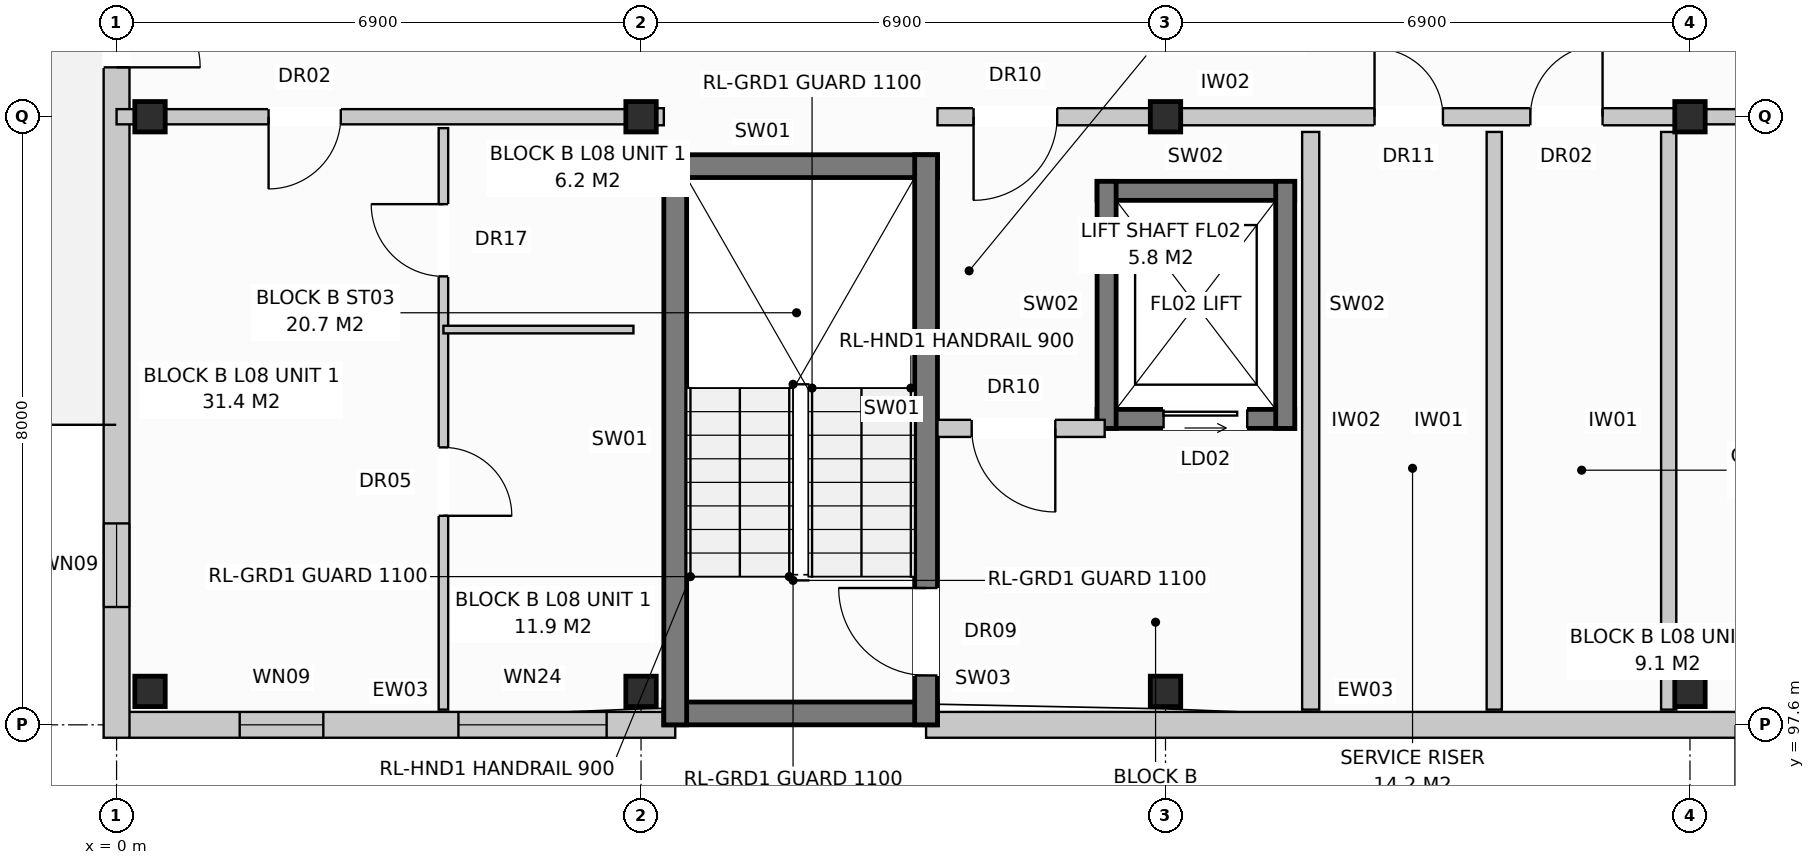
"""IFC4 building model, lengths in metres.
Left out: names, types, materials, properties, quantities, classifications, styles, units other than length and angle.
Written with IfcOpenShell. Run it as: python <this file> out.ifc"""

import sys

from ifc_helpers import new_model, si_unit, direction, frame, frame_2d, origin, origin_with_axes, origin_2d, place, context, subcontext, project, spatial, rectangle, extrude, element, fill, save


model = new_model("IFC4")
c1 = context("Model", 3, precision=1e-05, world=origin(), true_north=direction((0.0, 1.0)))
c2 = subcontext(c1, "Body", "Model", "MODEL_VIEW")
j1 = project(units=[si_unit("LENGTHUNIT", "METRE"), si_unit("PLANEANGLEUNIT", "RADIAN")], contexts=[c1])
p1 = place(None, origin())
s1 = spatial("IfcSite", under=j1, at=p1, CompositionType="ELEMENT")
p2 = place(p1, origin())
s2 = spatial("IfcBuilding", under=s1, at=p2, CompositionType="ELEMENT")
p3 = place(p2, frame((0.0, 0.0, 27.2)))
s3 = spatial("IfcBuildingStorey", under=s2, at=p3, CompositionType="ELEMENT", Elevation=27.2)
for number, where, z_axis, x_axis in (
    (1, (0.44, 98.04, 0.0), (0.0, 0.0, 1.0), (1.0, 0.0, 0.0)),
    (2, (0.44, 105.6, 0.0), (0.0, 0.0, 1.0), (1.0, 0.0, 0.0)),
    (3, (6.9, 98.04, 0.0), (0.0, 0.0, 1.0), (1.0, 0.0, 0.0)),
    (4, (6.9, 105.6, 0.0), (0.0, 0.0, 1.0), (1.0, 0.0, 0.0)),
    (5, (13.8, 98.04, 0.0), (0.0, 0.0, 1.0), (1.0, 0.0, 0.0)),
    (6, (13.8, 105.6, 0.0), (0.0, 0.0, 1.0), (1.0, 0.0, 0.0)),
    (7, (20.7, 98.04, 0.0), (0.0, 0.0, 1.0), (1.0, 0.0, 0.0)),
    (8, (20.7, 105.6, 0.0), (0.0, 0.0, 1.0), (1.0, 0.0, 0.0)),
):
    element("IfcColumn", number, at=place(p3, frame(where, z_axis=z_axis, x_axis=x_axis)), inside=s3, PredefinedType="COLUMN", context=c2, shape_type="SweptSolid", body=[
        extrude(rectangle(XDim=0.4, YDim=0.4, at=origin_2d()), origin(), (0.0, 0.0, 1.0), 3.2),
    ])
p4 = place(p3, frame((0.16, 97.6, 0.0), z_axis=(0.0, 0.0, 1.0), x_axis=(1.0, 0.0, 0.0)))
e9 = element("IfcWall", 9, at=p4, inside=s3, PredefinedType="STANDARD", context=c2, shape_type="SweptSolid", body=[
    extrude(rectangle(XDim=7.19, YDim=0.34, at=frame_2d((3.595, 0.0))), origin(), (0.0, 0.0, 1.0), 2.96),
])
p5 = place(p4, frame((1.46, 0.0, 0.72)))
e10 = element("IfcOpeningElement", 10, at=p5, cuts=e9, PredefinedType="OPENING", context=c2, shape_type="SweptSolid", body=[
    extrude(rectangle(XDim=1.1, YDim=1.5, at=frame_2d((0.55, 0.75))), frame((0.0, 0.182, 0.0), z_axis=(0.0, -1.0, 0.0), x_axis=(1.0, 0.0, 0.0)), (0.0, 0.0, 1.0), 0.364),
])
p6 = place(p4, frame((4.337, 0.0, 0.8)))
e11 = element("IfcOpeningElement", 11, at=p6, cuts=e9, PredefinedType="OPENING", context=c2, shape_type="SweptSolid", body=[
    extrude(rectangle(XDim=1.95, YDim=1.65, at=frame_2d((0.975, 0.825))), frame((0.0, 0.182, 0.0), z_axis=(0.0, -1.0, 0.0), x_axis=(1.0, 0.0, 0.0)), (0.0, 0.0, 1.0), 0.364),
])
p7 = place(p3, frame((10.65, 97.6, 0.0), z_axis=(0.0, 0.0, 1.0), x_axis=(1.0, 0.0, 0.0)))
e12 = element("IfcWall", 12, at=p7, inside=s3, PredefinedType="STANDARD", context=c2, shape_type="SweptSolid", body=[
    extrude(rectangle(XDim=17.4, YDim=0.34, at=frame_2d((8.7, 0.0))), origin(), (0.0, 0.0, 1.0), 2.96),
])
p8 = place(p7, frame((11.87, 0.0, 0.0)))
e13 = element("IfcOpeningElement", 13, at=p8, cuts=e12, PredefinedType="OPENING", context=c2, shape_type="SweptSolid", body=[
    extrude(rectangle(XDim=0.95, YDim=2.1, at=frame_2d((0.475, 1.05))), frame((0.0, 0.182, 0.0), z_axis=(0.0, -1.0, 0.0), x_axis=(1.0, 0.0, 0.0)), (0.0, 0.0, 1.0), 0.364),
])
p9 = place(p7, frame((14.87, 0.0, 0.72)))
e14 = element("IfcOpeningElement", 14, at=p9, cuts=e12, PredefinedType="OPENING", context=c2, shape_type="SweptSolid", body=[
    extrude(rectangle(XDim=1.1, YDim=1.5, at=frame_2d((0.55, 0.75))), frame((0.0, 0.182, 0.0), z_axis=(0.0, -1.0, 0.0), x_axis=(1.0, 0.0, 0.0)), (0.0, 0.0, 1.0), 0.364),
])
p10 = place(p3, frame((0.0, 97.43, 0.0), z_axis=(0.0, 0.0, 1.0), x_axis=(0.0, 1.0, 0.0)))
e15 = element("IfcWall", 15, at=p10, inside=s3, PredefinedType="STANDARD", context=c2, shape_type="SweptSolid", body=[
    extrude(rectangle(XDim=18.74, YDim=0.34, at=frame_2d((9.37, 0.0))), origin(), (0.0, 0.0, 1.0), 2.96),
])
p11 = place(p10, frame((8.82, 0.0, 0.0)))
e16 = element("IfcOpeningElement", 16, at=p11, cuts=e15, PredefinedType="OPENING", context=c2, shape_type="SweptSolid", body=[
    extrude(rectangle(XDim=1.1, YDim=2.1, at=frame_2d((0.55, 1.05))), frame((0.0, 0.182, 0.0), z_axis=(0.0, -1.0, 0.0), x_axis=(1.0, 0.0, 0.0)), (0.0, 0.0, 1.0), 0.364),
])
p12 = place(p10, frame((1.72, 0.0, 0.72)))
e17 = element("IfcOpeningElement", 17, at=p12, cuts=e15, PredefinedType="OPENING", context=c2, shape_type="SweptSolid", body=[
    extrude(rectangle(XDim=1.1, YDim=1.5, at=frame_2d((0.55, 0.75))), frame((0.0, 0.182, 0.0), z_axis=(0.0, -1.0, 0.0), x_axis=(1.0, 0.0, 0.0)), (0.0, 0.0, 1.0), 0.364),
])
p13 = place(p10, frame((15.92, 0.0, 0.72)))
e18 = element("IfcOpeningElement", 18, at=p13, cuts=e15, PredefinedType="OPENING", context=c2, shape_type="SweptSolid", body=[
    extrude(rectangle(XDim=1.1, YDim=1.5, at=frame_2d((0.55, 0.75))), frame((0.0, 0.182, 0.0), z_axis=(0.0, -1.0, 0.0), x_axis=(1.0, 0.0, 0.0)), (0.0, 0.0, 1.0), 0.364),
])
for number, where, z_axis, x_axis in (
    (19, (7.2, 97.75, 0.0), (0.0, 0.0, 1.0), (1.0, 0.0, 0.0)),
    (20, (7.2, 104.95, 0.0), (0.0, 0.0, 1.0), (1.0, 0.0, 0.0)),
):
    element("IfcWall", number, at=place(p3, frame(where, z_axis=z_axis, x_axis=x_axis)), inside=s3, PredefinedType="SHEAR", context=c2, shape_type="SweptSolid", body=[
        extrude(rectangle(XDim=3.6, YDim=0.3, at=frame_2d((1.8, 0.0))), origin(), (0.0, 0.0, 1.0), 2.96),
    ])
p14 = place(p3, frame((7.35, 97.6, 0.0), z_axis=(0.0, 0.0, 1.0), x_axis=(0.0, 1.0, 0.0)))
e21 = element("IfcWall", 21, at=p14, inside=s3, PredefinedType="SHEAR", context=c2, shape_type="SweptSolid", body=[
    extrude(rectangle(XDim=7.5, YDim=0.3, at=frame_2d((3.75, 0.0))), origin(), (0.0, 0.0, 1.0), 2.96),
])
p15 = place(p3, frame((10.65, 97.6, 0.0), z_axis=(0.0, 0.0, 1.0), x_axis=(0.0, 1.0, 0.0)))
e22 = element("IfcWall", 22, at=p15, inside=s3, PredefinedType="SHEAR", context=c2, shape_type="SweptSolid", body=[
    extrude(rectangle(XDim=7.5, YDim=0.3, at=frame_2d((3.75, 0.0))), origin(), (0.0, 0.0, 1.0), 2.96),
])
p16 = place(p15, frame((0.65, 0.0, 0.0)))
e23 = element("IfcOpeningElement", 23, at=p16, cuts=e22, PredefinedType="OPENING", context=c2, shape_type="SweptSolid", body=[
    extrude(rectangle(XDim=1.15, YDim=2.15, at=frame_2d((0.575, 1.075))), frame((0.0, 0.162, 0.0), z_axis=(0.0, -1.0, 0.0), x_axis=(1.0, 0.0, 0.0)), (0.0, 0.0, 1.0), 0.324),
])
p17 = place(p3, frame((12.9, 101.625, 0.0), z_axis=(0.0, 0.0, 1.0), x_axis=(1.0, 0.0, 0.0)))
e24 = element("IfcWall", 24, at=p17, inside=s3, PredefinedType="SHEAR", context=c2, shape_type="SweptSolid", body=[
    extrude(rectangle(XDim=2.6, YDim=0.25, at=frame_2d((1.3, 0.0))), origin(), (0.0, 0.0, 1.0), 2.96),
])
p18 = place(p17, frame((0.875, 0.0, 0.0)))
e25 = element("IfcOpeningElement", 25, at=p18, cuts=e24, PredefinedType="OPENING", context=c2, shape_type="SweptSolid", body=[
    extrude(rectangle(XDim=1.1, YDim=2.1, at=frame_2d((0.55, 1.05))), frame((0.0, 0.137, 0.0), z_axis=(0.0, -1.0, 0.0), x_axis=(1.0, 0.0, 0.0)), (0.0, 0.0, 1.0), 0.274),
])
p19 = place(p3, frame((12.9, 104.625, 0.0), z_axis=(0.0, 0.0, 1.0), x_axis=(1.0, 0.0, 0.0)))
e26 = element("IfcWall", 26, at=p19, inside=s3, PredefinedType="SHEAR", context=c2, shape_type="SweptSolid", body=[
    extrude(rectangle(XDim=2.6, YDim=0.25, at=frame_2d((1.3, 0.0))), origin(), (0.0, 0.0, 1.0), 2.96),
])
for number, where, z_axis, x_axis in (
    (27, (13.025, 101.5, 0.0), (0.0, 0.0, 1.0), (0.0, 1.0, 0.0)),
    (28, (15.375, 101.5, 0.0), (0.0, 0.0, 1.0), (0.0, 1.0, 0.0)),
):
    element("IfcWall", number, at=place(p3, frame(where, z_axis=z_axis, x_axis=x_axis)), inside=s3, PredefinedType="SHEAR", context=c2, shape_type="SweptSolid", body=[
        extrude(rectangle(XDim=3.25, YDim=0.25, at=frame_2d((1.625, 0.0))), origin(), (0.0, 0.0, 1.0), 2.96),
    ])
p20 = place(p3, frame((15.71, 97.8, 0.0), z_axis=(0.0, 0.0, 1.0), x_axis=(0.0, 1.0, 0.0)))
e29 = element("IfcWall", 29, at=p20, inside=s3, PredefinedType="PARTITIONING", context=c2, shape_type="SweptSolid", body=[
    extrude(rectangle(XDim=7.6, YDim=0.225, at=frame_2d((3.8, 0.0))), origin(), (0.0, 0.0, 1.0), 2.59),
])
p21 = place(p3, frame((10.8, 101.5, 0.0), z_axis=(0.0, 0.0, 1.0), x_axis=(1.0, 0.0, 0.0)))
e30 = element("IfcWall", 30, at=p21, inside=s3, PredefinedType="PARTITIONING", context=c2, shape_type="SweptSolid", body=[
    extrude(rectangle(XDim=2.2, YDim=0.225, at=frame_2d((1.1, 0.0))), origin(), (0.0, 0.0, 1.0), 2.96),
])
p22 = place(p21, frame((0.45, 0.0, 0.0)))
e31 = element("IfcOpeningElement", 31, at=p22, cuts=e30, PredefinedType="OPENING", context=c2, shape_type="SweptSolid", body=[
    extrude(rectangle(XDim=1.1, YDim=2.15, at=frame_2d((0.55, 1.075))), frame((0.0, 0.125, 0.0), z_axis=(0.0, -1.0, 0.0), x_axis=(1.0, 0.0, 0.0)), (0.0, 0.0, 1.0), 0.249),
])
p23 = place(p3, frame((6.9, 105.6, 0.0), z_axis=(0.0, 0.0, 1.0), x_axis=(1.0, 0.0, 0.0)))
e32 = element("IfcWall", 32, at=p23, inside=s3, PredefinedType="PARTITIONING", context=c2, shape_type="SweptSolid", body=[
    extrude(rectangle(XDim=0.3, YDim=0.225, at=frame_2d((0.15, 0.0))), origin(), (0.0, 0.0, 1.0), 2.96),
])
for number, where, z_axis, x_axis in (
    (33, (18.125, 97.8, 0.0), (0.0, 0.0, 1.0), (0.0, 1.0, 0.0)),
    (34, (20.42, 97.8, 0.0), (0.0, 0.0, 1.0), (0.0, 1.0, 0.0)),
):
    element("IfcWall", number, at=place(p3, frame(where, z_axis=z_axis, x_axis=x_axis)), inside=s3, PredefinedType="PARTITIONING", context=c2, shape_type="SweptSolid", body=[
        extrude(rectangle(XDim=7.6, YDim=0.2, at=frame_2d((3.8, 0.0))), origin(), (0.0, 0.0, 1.0), 2.96),
    ])
p24 = place(p3, frame((10.8, 105.6, 0.0), z_axis=(0.0, 0.0, 1.0), x_axis=(1.0, 0.0, 0.0)))
e35 = element("IfcWall", 35, at=p24, inside=s3, PredefinedType="PARTITIONING", context=c2, shape_type="SweptSolid", body=[
    extrude(rectangle(XDim=9.9, YDim=0.225, at=frame_2d((4.95, 0.0))), origin(), (0.0, 0.0, 1.0), 2.4),
])
p25 = place(p24, frame((0.475, 0.0, 0.0)))
e36 = element("IfcOpeningElement", 36, at=p25, cuts=e35, PredefinedType="OPENING", context=c2, shape_type="SweptSolid", body=[
    extrude(rectangle(XDim=1.1, YDim=2.15, at=frame_2d((0.55, 1.075))), frame((0.0, 0.125, 0.0), z_axis=(0.0, -1.0, 0.0), x_axis=(1.0, 0.0, 0.0)), (0.0, 0.0, 1.0), 0.249),
])
p26 = place(p24, frame((5.75, 0.0, 0.0)))
e37 = element("IfcOpeningElement", 37, at=p26, cuts=e35, PredefinedType="OPENING", context=c2, shape_type="SweptSolid", body=[
    extrude(rectangle(XDim=0.9, YDim=2.1, at=frame_2d((0.45, 1.05))), frame((0.0, 0.125, 0.0), z_axis=(0.0, -1.0, 0.0), x_axis=(1.0, 0.0, 0.0)), (0.0, 0.0, 1.0), 0.249),
])
p27 = place(p24, frame((7.8, 0.0, 0.0)))
e38 = element("IfcOpeningElement", 38, at=p27, cuts=e35, PredefinedType="OPENING", context=c2, shape_type="SweptSolid", body=[
    extrude(rectangle(XDim=0.95, YDim=2.15, at=frame_2d((0.475, 1.075))), frame((0.0, 0.125, 0.0), z_axis=(0.0, -1.0, 0.0), x_axis=(1.0, 0.0, 0.0)), (0.0, 0.0, 1.0), 0.249),
])
p28 = place(p3, frame((0.0, 105.6, 0.0), z_axis=(0.0, 0.0, 1.0), x_axis=(1.0, 0.0, 0.0)))
e39 = element("IfcWall", 39, at=p28, inside=s3, PredefinedType="PARTITIONING", context=c2, shape_type="SweptSolid", body=[
    extrude(rectangle(XDim=6.9, YDim=0.2, at=frame_2d((3.45, 0.0))), origin(), (0.0, 0.0, 1.0), 2.4),
])
p29 = place(p28, frame((2.0, 0.0, 0.0)))
e40 = element("IfcOpeningElement", 40, at=p29, cuts=e39, PredefinedType="OPENING", context=c2, shape_type="SweptSolid", body=[
    extrude(rectangle(XDim=0.95, YDim=2.15, at=frame_2d((0.475, 1.075))), frame((0.0, 0.112, 0.0), z_axis=(0.0, -1.0, 0.0), x_axis=(1.0, 0.0, 0.0)), (0.0, 0.0, 1.0), 0.224),
])
p30 = place(p3, frame((4.3, 105.45, 0.0), z_axis=(0.0, 0.0, 1.0), x_axis=(0.0, -1.0, 0.0)))
e41 = element("IfcWall", 41, at=p30, inside=s3, PredefinedType="PARTITIONING", context=c2, shape_type="SweptSolid", body=[
    extrude(rectangle(XDim=7.65, YDim=0.125, at=frame_2d((3.825, 0.0))), origin(), (0.0, 0.0, 1.0), 2.96),
])
p31 = place(p30, frame((1.0, 0.0, 0.0)))
e42 = element("IfcOpeningElement", 42, at=p31, cuts=e41, PredefinedType="OPENING", context=c2, shape_type="SweptSolid", body=[
    extrude(rectangle(XDim=0.95, YDim=2.1, at=frame_2d((0.475, 1.05))), frame((0.0, 0.074, 0.0), z_axis=(0.0, -1.0, 0.0), x_axis=(1.0, 0.0, 0.0)), (0.0, 0.0, 1.0), 0.149),
])
p32 = place(p30, frame((4.2, 0.0, 0.0)))
e43 = element("IfcOpeningElement", 43, at=p32, cuts=e41, PredefinedType="OPENING", context=c2, shape_type="SweptSolid", body=[
    extrude(rectangle(XDim=0.9, YDim=2.1, at=frame_2d((0.45, 1.05))), frame((0.0, 0.074, 0.0), z_axis=(0.0, -1.0, 0.0), x_axis=(1.0, 0.0, 0.0)), (0.0, 0.0, 1.0), 0.149),
])
p33 = place(p3, frame((4.3, 102.8, 0.0), z_axis=(0.0, 0.0, 1.0), x_axis=(1.0, 0.0, 0.0)))
e44 = element("IfcWall", 44, at=p33, inside=s3, PredefinedType="PARTITIONING", context=c2, shape_type="SweptSolid", body=[
    extrude(rectangle(XDim=2.5, YDim=0.1, at=frame_2d((1.25, 0.0))), origin(), (0.0, 0.0, 1.0), 2.96),
])
p34 = place(p3, frame((20.7, 105.6, 0.0), z_axis=(0.0, 0.0, 1.0), x_axis=(1.0, 0.0, 0.0)))
e45 = element("IfcWall", 45, at=p34, inside=s3, PredefinedType="PARTITIONING", context=c2, shape_type="SweptSolid", body=[
    extrude(rectangle(XDim=6.9, YDim=0.2, at=frame_2d((3.45, 0.0))), origin(), (0.0, 0.0, 1.0), 2.4),
])
p35 = place(p34, frame((2.0, 0.0, 0.0)))
e46 = element("IfcOpeningElement", 46, at=p35, cuts=e45, PredefinedType="OPENING", context=c2, shape_type="SweptSolid", body=[
    extrude(rectangle(XDim=0.95, YDim=2.15, at=frame_2d((0.475, 1.075))), frame((0.0, 0.112, 0.0), z_axis=(0.0, -1.0, 0.0), x_axis=(1.0, 0.0, 0.0)), (0.0, 0.0, 1.0), 0.224),
])
p36 = place(p5, origin_with_axes())
e47 = element("IfcWindow", 47, at=p36, inside=s3, PartitioningType="SINGLE_PANEL", PredefinedType="WINDOW", context=c2, shape_type="SweptSolid", body=[
    extrude(rectangle(XDim=1.1, YDim=1.5, at=frame_2d((0.55, 0.75))), frame((0.0, 0.03, 0.0), z_axis=(0.0, -1.0, 0.0), x_axis=(1.0, 0.0, 0.0)), (0.0, 0.0, 1.0), 0.06),
])
fill(e10, e47)
p37 = place(p6, origin_with_axes())
e48 = element("IfcWindow", 48, at=p37, inside=s3, PartitioningType="SINGLE_PANEL", PredefinedType="WINDOW", context=c2, shape_type="SweptSolid", body=[
    extrude(rectangle(XDim=1.95, YDim=1.65, at=frame_2d((0.975, 0.825))), frame((0.0, 0.03, 0.0), z_axis=(0.0, -1.0, 0.0), x_axis=(1.0, 0.0, 0.0)), (0.0, 0.0, 1.0), 0.06),
])
fill(e11, e48)
p38 = place(p11, frame((1.1, 0.0, 0.0), z_axis=(0.0, 0.0, 1.0), x_axis=(-1.0, 0.0, 0.0)))
e49 = element("IfcDoor", 49, at=p38, inside=s3, OperationType="SINGLE_SWING_LEFT", PredefinedType="DOOR", context=c2, shape_type="SweptSolid", body=[
    extrude(rectangle(XDim=1.1, YDim=2.1, at=frame_2d((0.55, 1.05))), frame((0.0, 0.025, 0.0), z_axis=(0.0, -1.0, 0.0), x_axis=(1.0, 0.0, 0.0)), (0.0, 0.0, 1.0), 0.05),
])
fill(e16, e49)
p39 = place(p12, origin_with_axes())
e50 = element("IfcWindow", 50, at=p39, inside=s3, PartitioningType="SINGLE_PANEL", PredefinedType="WINDOW", context=c2, shape_type="SweptSolid", body=[
    extrude(rectangle(XDim=1.1, YDim=1.5, at=frame_2d((0.55, 0.75))), frame((0.0, 0.03, 0.0), z_axis=(0.0, -1.0, 0.0), x_axis=(1.0, 0.0, 0.0)), (0.0, 0.0, 1.0), 0.06),
])
fill(e17, e50)
p40 = place(p16, origin_with_axes())
e51 = element("IfcDoor", 51, at=p40, inside=s3, OperationType="SINGLE_SWING_RIGHT", PredefinedType="DOOR", context=c2, shape_type="SweptSolid", body=[
    extrude(rectangle(XDim=1.15, YDim=2.15, at=frame_2d((0.575, 1.075))), frame((0.0, 0.025, 0.0), z_axis=(0.0, -1.0, 0.0), x_axis=(1.0, 0.0, 0.0)), (0.0, 0.0, 1.0), 0.05),
])
fill(e23, e51)
p41 = place(p18, origin_with_axes())
e52 = element("IfcDoor", 52, at=p41, inside=s3, OperationType="SLIDING_TO_LEFT", PredefinedType="DOOR", context=c2, shape_type="SweptSolid", body=[
    extrude(rectangle(XDim=1.1, YDim=2.1, at=frame_2d((0.55, 1.05))), frame((0.0, 0.025, 0.0), z_axis=(0.0, -1.0, 0.0), x_axis=(1.0, 0.0, 0.0)), (0.0, 0.0, 1.0), 0.05),
])
fill(e25, e52)
p42 = place(p22, frame((1.1, 0.0, 0.0), z_axis=(0.0, 0.0, 1.0), x_axis=(-1.0, 0.0, 0.0)))
e53 = element("IfcDoor", 53, at=p42, inside=s3, OperationType="SINGLE_SWING_RIGHT", PredefinedType="DOOR", context=c2, shape_type="SweptSolid", body=[
    extrude(rectangle(XDim=1.1, YDim=2.15, at=frame_2d((0.55, 1.075))), frame((0.0, 0.025, 0.0), z_axis=(0.0, -1.0, 0.0), x_axis=(1.0, 0.0, 0.0)), (0.0, 0.0, 1.0), 0.05),
])
fill(e31, e53)
p43 = place(p25, frame((1.1, 0.0, 0.0), z_axis=(0.0, 0.0, 1.0), x_axis=(-1.0, 0.0, 0.0)))
e54 = element("IfcDoor", 54, at=p43, inside=s3, OperationType="SINGLE_SWING_LEFT", PredefinedType="DOOR", context=c2, shape_type="SweptSolid", body=[
    extrude(rectangle(XDim=1.1, YDim=2.15, at=frame_2d((0.55, 1.075))), frame((0.0, 0.025, 0.0), z_axis=(0.0, -1.0, 0.0), x_axis=(1.0, 0.0, 0.0)), (0.0, 0.0, 1.0), 0.05),
])
fill(e36, e54)
p44 = place(p26, origin_with_axes())
e55 = element("IfcDoor", 55, at=p44, inside=s3, OperationType="SINGLE_SWING_LEFT", PredefinedType="DOOR", context=c2, shape_type="SweptSolid", body=[
    extrude(rectangle(XDim=0.9, YDim=2.1, at=frame_2d((0.45, 1.05))), frame((0.0, 0.025, 0.0), z_axis=(0.0, -1.0, 0.0), x_axis=(1.0, 0.0, 0.0)), (0.0, 0.0, 1.0), 0.05),
])
fill(e37, e55)
p45 = place(p27, origin_with_axes())
e56 = element("IfcDoor", 56, at=p45, inside=s3, OperationType="SINGLE_SWING_RIGHT", PredefinedType="DOOR", context=c2, shape_type="SweptSolid", body=[
    extrude(rectangle(XDim=0.95, YDim=2.15, at=frame_2d((0.475, 1.075))), frame((0.0, 0.025, 0.0), z_axis=(0.0, -1.0, 0.0), x_axis=(1.0, 0.0, 0.0)), (0.0, 0.0, 1.0), 0.05),
])
fill(e38, e56)
p46 = place(p29, frame((0.95, 0.0, 0.0), z_axis=(0.0, 0.0, 1.0), x_axis=(-1.0, 0.0, 0.0)))
e57 = element("IfcDoor", 57, at=p46, inside=s3, OperationType="SINGLE_SWING_LEFT", PredefinedType="DOOR", context=c2, shape_type="SweptSolid", body=[
    extrude(rectangle(XDim=0.95, YDim=2.15, at=frame_2d((0.475, 1.075))), frame((0.0, 0.025, 0.0), z_axis=(0.0, -1.0, 0.0), x_axis=(1.0, 0.0, 0.0)), (0.0, 0.0, 1.0), 0.05),
])
fill(e40, e57)
p47 = place(p31, frame((0.95, 0.0, 0.0), z_axis=(0.0, 0.0, 1.0), x_axis=(-1.0, 0.0, 0.0)))
e58 = element("IfcDoor", 58, at=p47, inside=s3, OperationType="SINGLE_SWING_LEFT", PredefinedType="DOOR", context=c2, shape_type="SweptSolid", body=[
    extrude(rectangle(XDim=0.95, YDim=2.1, at=frame_2d((0.475, 1.05))), frame((0.0, 0.025, 0.0), z_axis=(0.0, -1.0, 0.0), x_axis=(1.0, 0.0, 0.0)), (0.0, 0.0, 1.0), 0.05),
])
fill(e42, e58)
p48 = place(p32, origin_with_axes())
e59 = element("IfcDoor", 59, at=p48, inside=s3, OperationType="SINGLE_SWING_RIGHT", PredefinedType="DOOR", context=c2, shape_type="SweptSolid", body=[
    extrude(rectangle(XDim=0.9, YDim=2.1, at=frame_2d((0.45, 1.05))), frame((0.0, 0.025, 0.0), z_axis=(0.0, -1.0, 0.0), x_axis=(1.0, 0.0, 0.0)), (0.0, 0.0, 1.0), 0.05),
])
fill(e43, e59)
save(model, sys.argv[1])
